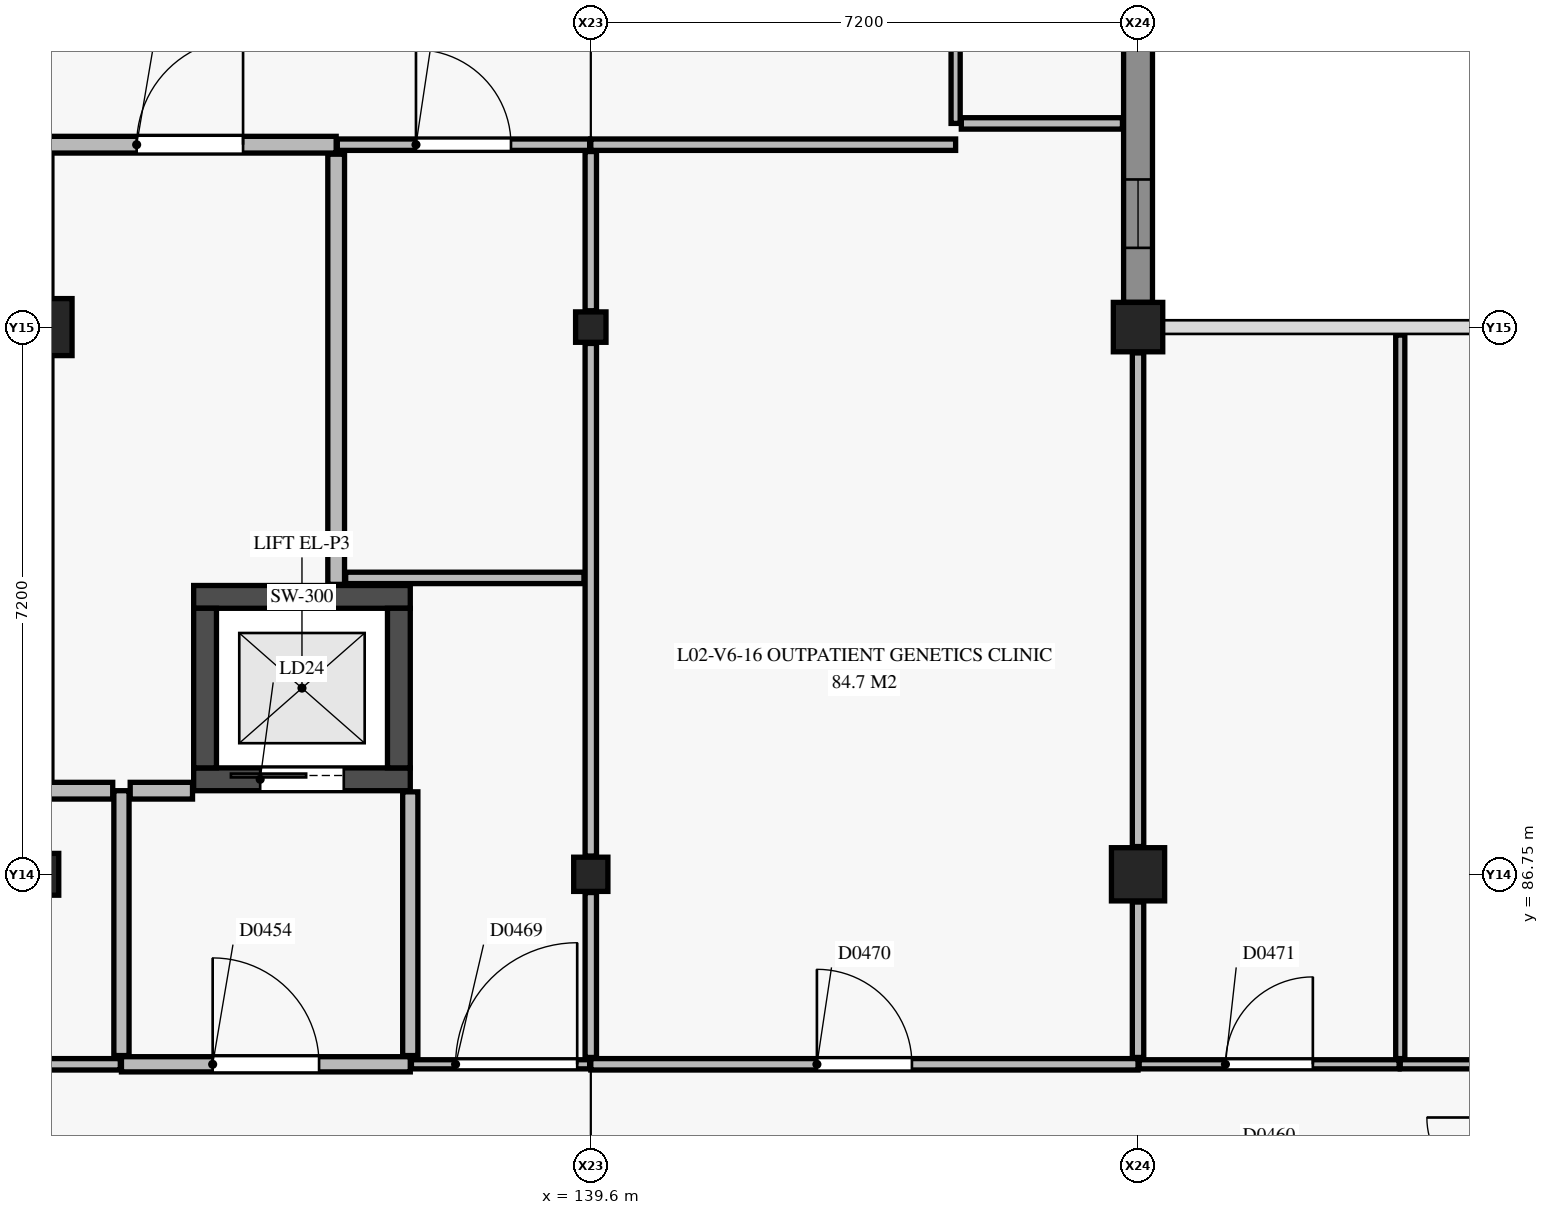
"""IFC4 building model, lengths in metres.
Left out: names, types, materials, properties, quantities, classifications, styles, units other than length and angle.
Written with IfcOpenShell. Run it as: python <this file> out.ifc"""

import sys

from ifc_helpers import new_model, si_unit, direction, frame, frame_2d, origin, origin_2d, place, context, subcontext, project, spatial, rectangle, extrude, element, fill, save


model = new_model("IFC4")
c1 = context("Model", 3, precision=1e-05, world=origin(), true_north=direction((0.0, 1.0)))
c2 = subcontext(c1, "Body", "Model", "MODEL_VIEW")
j1 = project(units=[si_unit("LENGTHUNIT", "METRE"), si_unit("PLANEANGLEUNIT", "RADIAN")], contexts=[c1])
p1 = place(None, origin())
s1 = spatial("IfcSite", under=j1, at=p1, CompositionType="ELEMENT")
p2 = place(p1, origin())
s2 = spatial("IfcBuilding", under=s1, at=p2, CompositionType="ELEMENT")
p3 = place(p2, frame((0.0, 0.0, 9.0)))
s3 = spatial("IfcBuildingStorey", under=s2, at=p3, CompositionType="ELEMENT", Elevation=9.0)
p4 = place(p3, frame((132.4, 86.75, 0.0), z_axis=(0.0, 0.0, 1.0), x_axis=(1.0, 0.0, 0.0)))
e1 = element("IfcColumn", 1, at=p4, inside=s3, PredefinedType="COLUMN", context=c2, shape_type="SweptSolid", body=[
    extrude(rectangle(XDim=0.4, YDim=0.55, at=origin_2d()), origin(), (0.0, 0.0, 1.0), 4.2),
])
p5 = place(p3, frame((132.4, 93.95, 0.0), z_axis=(0.0, 0.0, 1.0), x_axis=(1.0, 0.0, 0.0)))
e2 = element("IfcColumn", 2, at=p5, inside=s3, PredefinedType="COLUMN", context=c2, shape_type="SweptSolid", body=[
    extrude(rectangle(XDim=0.75, YDim=0.75, at=origin_2d()), origin(), (0.0, 0.0, 1.0), 4.2),
])
p6 = place(p3, frame((139.6, 86.75, 0.0), z_axis=(0.0, 0.0, 1.0), x_axis=(1.0, 0.0, 0.0)))
e3 = element("IfcColumn", 3, at=p6, inside=s3, PredefinedType="COLUMN", context=c2, shape_type="SweptSolid", body=[
    extrude(rectangle(XDim=0.45, YDim=0.45, at=origin_2d()), origin(), (0.0, 0.0, 1.0), 4.2),
])
p7 = place(p3, frame((139.6, 93.95, 0.0), z_axis=(0.0, 0.0, 1.0), x_axis=(1.0, 0.0, 0.0)))
e4 = element("IfcColumn", 4, at=p7, inside=s3, PredefinedType="COLUMN", context=c2, shape_type="SweptSolid", body=[
    extrude(rectangle(XDim=0.4, YDim=0.4, at=origin_2d()), origin(), (0.0, 0.0, 1.0), 4.2),
])
p8 = place(p3, frame((146.8, 86.75, 0.0), z_axis=(0.0, 0.0, 1.0), x_axis=(1.0, 0.0, 0.0)))
e5 = element("IfcColumn", 5, at=p8, inside=s3, PredefinedType="COLUMN", context=c2, shape_type="SweptSolid", body=[
    extrude(rectangle(XDim=0.7, YDim=0.7, at=origin_2d()), origin(), (0.0, 0.0, 1.0), 4.2),
])
p9 = place(p3, frame((146.8, 93.95, 0.0), z_axis=(0.0, 0.0, 1.0), x_axis=(1.0, 0.0, 0.0)))
e6 = element("IfcColumn", 6, at=p9, inside=s3, PredefinedType="COLUMN", context=c2, shape_type="SweptSolid", body=[
    extrude(rectangle(XDim=0.65, YDim=0.65, at=origin_2d()), origin(), (0.0, 0.0, 1.0), 4.2),
])
p10 = place(p3, frame((134.375, 88.0, 0.0), z_axis=(0.0, 0.0, 1.0), x_axis=(1.0, 0.0, 0.0)))
e7 = element("IfcWall", 7, at=p10, inside=s3, PredefinedType="SHEAR", context=c2, shape_type="SweptSolid", body=[
    extrude(rectangle(XDim=2.85, YDim=0.3, at=frame_2d((1.425, 0.0))), origin(), (0.0, 0.0, 1.0), 3.95),
])
p11 = place(p10, frame((0.875, 0.0, 0.0)))
e8 = element("IfcOpeningElement", 8, at=p11, cuts=e7, PredefinedType="OPENING", context=c2, shape_type="SweptSolid", body=[
    extrude(rectangle(XDim=1.1, YDim=2.15, at=frame_2d((0.55, 1.075))), frame((0.0, 0.16, 0.0), z_axis=(0.0, -1.0, 0.0), x_axis=(1.0, 0.0, 0.0)), (0.0, 0.0, 1.0), 0.32),
])
p12 = place(p3, frame((134.375, 90.4, 0.0), z_axis=(0.0, 0.0, 1.0), x_axis=(1.0, 0.0, 0.0)))
e9 = element("IfcWall", 9, at=p12, inside=s3, PredefinedType="SHEAR", context=c2, shape_type="SweptSolid", body=[
    extrude(rectangle(XDim=2.85, YDim=0.3, at=frame_2d((1.425, 0.0))), origin(), (0.0, 0.0, 1.0), 3.95),
])
for number, where, z_axis, x_axis in (
    (10, (134.525, 88.15, 0.0), (0.0, 0.0, 1.0), (0.0, 1.0, 0.0)),
    (11, (137.075, 88.15, 0.0), (0.0, 0.0, 1.0), (0.0, 1.0, 0.0)),
):
    element("IfcWall", number, at=place(p3, frame(where, z_axis=z_axis, x_axis=x_axis)), inside=s3, PredefinedType="SHEAR", context=c2, shape_type="SweptSolid", body=[
        extrude(rectangle(XDim=2.1, YDim=0.3, at=frame_2d((1.05, 0.0))), origin(), (0.0, 0.0, 1.0), 3.95),
    ])
p13 = place(p3, frame((146.8, 100.85, 0.0), z_axis=(0.0, 0.0, 1.0), x_axis=(0.0, -1.0, 0.0)))
e12 = element("IfcWall", 12, at=p13, inside=s3, PredefinedType="USERDEFINED", context=c2, shape_type="SweptSolid", body=[
    extrude(rectangle(XDim=6.575, YDim=0.38, at=frame_2d((3.288, 0.0))), origin(), (0.0, 0.0, 1.0), 3.13),
])
p14 = place(p13, frame((1.3, 0.0, 0.9)))
e13 = element("IfcOpeningElement", 13, at=p14, cuts=e12, PredefinedType="OPENING", context=c2, shape_type="SweptSolid", body=[
    extrude(rectangle(XDim=1.6, YDim=1.8, at=frame_2d((0.8, 0.9))), frame((0.0, 0.2, 0.0), z_axis=(0.0, -1.0, 0.0), x_axis=(1.0, 0.0, 0.0)), (0.0, 0.0, 1.0), 0.4),
])
p15 = place(p13, frame((4.958, 0.0, 0.95)))
e14 = element("IfcOpeningElement", 14, at=p15, cuts=e12, PredefinedType="OPENING", context=c2, shape_type="SweptSolid", body=[
    extrude(rectangle(XDim=0.9, YDim=1.2, at=frame_2d((0.45, 0.6))), frame((0.0, 0.2, 0.0), z_axis=(0.0, -1.0, 0.0), x_axis=(1.0, 0.0, 0.0)), (0.0, 0.0, 1.0), 0.4),
])
p16 = place(p3, frame((133.425, 84.25, 0.0), z_axis=(0.0, 0.0, 1.0), x_axis=(1.0, 0.0, 0.0)))
e15 = element("IfcWall", 15, at=p16, inside=s3, PredefinedType="PARTITIONING", context=c2, shape_type="SweptSolid", body=[
    extrude(rectangle(XDim=3.8, YDim=0.2, at=frame_2d((1.9, 0.0))), origin(), (0.0, 0.0, 1.0), 3.515),
])
p17 = place(p16, frame((1.2, 0.0, 0.0)))
e16 = element("IfcOpeningElement", 16, at=p17, cuts=e15, PredefinedType="OPENING", context=c2, shape_type="SweptSolid", body=[
    extrude(rectangle(XDim=1.4, YDim=2.2, at=frame_2d((0.7, 1.1))), frame((0.0, 0.11, 0.0), z_axis=(0.0, -1.0, 0.0), x_axis=(1.0, 0.0, 0.0)), (0.0, 0.0, 1.0), 0.22),
])
p18 = place(p3, frame((137.225, 84.365, 0.0), z_axis=(0.0, 0.0, 1.0), x_axis=(0.0, 1.0, 0.0)))
e17 = element("IfcWall", 17, at=p18, inside=s3, PredefinedType="PARTITIONING", context=c2, shape_type="SweptSolid", body=[
    extrude(rectangle(XDim=3.47, YDim=0.2, at=frame_2d((1.735, 0.0))), origin(), (0.0, 0.0, 1.0), 3.355),
])
p19 = place(p3, frame((133.425, 84.365, 0.0), z_axis=(0.0, 0.0, 1.0), x_axis=(0.0, 1.0, 0.0)))
e18 = element("IfcWall", 18, at=p19, inside=s3, PredefinedType="PARTITIONING", context=c2, shape_type="SweptSolid", body=[
    extrude(rectangle(XDim=3.485, YDim=0.2, at=frame_2d((1.743, 0.0))), origin(), (0.0, 0.0, 1.0), 3.355),
])
p20 = place(p3, frame((132.4, 96.35, 0.0), z_axis=(0.0, 0.0, 1.0), x_axis=(1.0, 0.0, 0.0)))
e19 = element("IfcWall", 19, at=p20, inside=s3, PredefinedType="PARTITIONING", context=c2, shape_type="SweptSolid", body=[
    extrude(rectangle(XDim=3.85, YDim=0.22, at=frame_2d((1.925, 0.0))), origin(), (0.0, 0.0, 1.0), 3.415),
])
p21 = place(p20, frame((1.225, 0.0, 0.0)))
e20 = element("IfcOpeningElement", 20, at=p21, cuts=e19, PredefinedType="OPENING", context=c2, shape_type="SweptSolid", body=[
    extrude(rectangle(XDim=1.4, YDim=2.2, at=frame_2d((0.7, 1.1))), frame((0.0, 0.12, 0.0), z_axis=(0.0, -1.0, 0.0), x_axis=(1.0, 0.0, 0.0)), (0.0, 0.0, 1.0), 0.24),
])
p22 = place(p3, frame((132.415, 84.25, 0.0), z_axis=(0.0, 0.0, 1.0), x_axis=(1.0, 0.0, 0.0)))
e21 = element("IfcWall", 21, at=p22, inside=s3, PredefinedType="PARTITIONING", context=c2, shape_type="SweptSolid", body=[
    extrude(rectangle(XDim=0.995, YDim=0.15, at=frame_2d((0.498, 0.0))), origin(), (0.0, 0.0, 1.0), 3.285),
])
p23 = place(p3, frame((139.6, 84.25, 0.0), z_axis=(0.0, 0.0, 1.0), x_axis=(1.0, 0.0, 0.0)))
e22 = element("IfcWall", 22, at=p23, inside=s3, PredefinedType="PARTITIONING", context=c2, shape_type="SweptSolid", body=[
    extrude(rectangle(XDim=7.2, YDim=0.15, at=frame_2d((3.6, 0.0))), origin(), (0.0, 0.0, 1.0), 3.285),
])
p24 = place(p23, frame((2.975, 0.0, 0.0)))
e23 = element("IfcOpeningElement", 23, at=p24, cuts=e22, PredefinedType="OPENING", context=c2, shape_type="SweptSolid", body=[
    extrude(rectangle(XDim=1.25, YDim=2.15, at=frame_2d((0.625, 1.075))), frame((0.0, 0.085, 0.0), z_axis=(0.0, -1.0, 0.0), x_axis=(1.0, 0.0, 0.0)), (0.0, 0.0, 1.0), 0.17),
])
p25 = place(p3, frame((139.6, 96.35, 0.0), z_axis=(0.0, 0.0, 1.0), x_axis=(1.0, 0.0, 0.0)))
e24 = element("IfcWall", 24, at=p25, inside=s3, PredefinedType="PARTITIONING", context=c2, shape_type="SweptSolid", body=[
    extrude(rectangle(XDim=4.8, YDim=0.15, at=frame_2d((2.4, 0.0))), origin(), (0.0, 0.0, 1.0), 3.285),
])
p26 = place(p3, frame((136.265, 96.35, 0.0), z_axis=(0.0, 0.0, 1.0), x_axis=(1.0, 0.0, 0.0)))
e25 = element("IfcWall", 25, at=p26, inside=s3, PredefinedType="PARTITIONING", context=c2, shape_type="SweptSolid", body=[
    extrude(rectangle(XDim=3.32, YDim=0.15, at=frame_2d((1.66, 0.0))), origin(), (0.0, 0.0, 1.0), 3.285),
])
p27 = place(p26, frame((1.035, 0.0, 0.0)))
e26 = element("IfcOpeningElement", 26, at=p27, cuts=e25, PredefinedType="OPENING", context=c2, shape_type="SweptSolid", body=[
    extrude(rectangle(XDim=1.25, YDim=2.15, at=frame_2d((0.625, 1.075))), frame((0.0, 0.085, 0.0), z_axis=(0.0, -1.0, 0.0), x_axis=(1.0, 0.0, 0.0)), (0.0, 0.0, 1.0), 0.17),
])
p28 = place(p3, frame((150.25, 84.25, 0.0), z_axis=(0.0, 0.0, 1.0), x_axis=(1.0, 0.0, 0.0)))
e27 = element("IfcWall", 27, at=p28, inside=s3, PredefinedType="PARTITIONING", context=c2, shape_type="SweptSolid", body=[
    extrude(rectangle(XDim=1.35, YDim=0.12, at=frame_2d((0.675, 0.0))), origin(), (0.0, 0.0, 1.0), 3.95),
])
p29 = place(p3, frame((137.24, 84.25, 0.0), z_axis=(0.0, 0.0, 1.0), x_axis=(1.0, 0.0, 0.0)))
e28 = element("IfcWall", 28, at=p29, inside=s3, PredefinedType="PARTITIONING", context=c2, shape_type="SweptSolid", body=[
    extrude(rectangle(XDim=2.345, YDim=0.12, at=frame_2d((1.172, 0.0))), origin(), (0.0, 0.0, 1.0), 3.455),
])
p30 = place(p29, frame((0.581, 0.0, 0.0)))
e29 = element("IfcOpeningElement", 29, at=p30, cuts=e28, PredefinedType="OPENING", context=c2, shape_type="SweptSolid", body=[
    extrude(rectangle(XDim=1.6, YDim=2.25, at=frame_2d((0.8, 1.125))), frame((0.0, 0.07, 0.0), z_axis=(0.0, -1.0, 0.0), x_axis=(1.0, 0.0, 0.0)), (0.0, 0.0, 1.0), 0.14),
])
p31 = place(p3, frame((146.815, 84.25, 0.0), z_axis=(0.0, 0.0, 1.0), x_axis=(1.0, 0.0, 0.0)))
e30 = element("IfcWall", 30, at=p31, inside=s3, PredefinedType="PARTITIONING", context=c2, shape_type="SweptSolid", body=[
    extrude(rectangle(XDim=3.42, YDim=0.12, at=frame_2d((1.71, 0.0))), origin(), (0.0, 0.0, 1.0), 3.285),
])
p32 = place(p31, frame((1.135, 0.0, 0.0)))
e31 = element("IfcOpeningElement", 31, at=p32, cuts=e30, PredefinedType="OPENING", context=c2, shape_type="SweptSolid", body=[
    extrude(rectangle(XDim=1.15, YDim=2.15, at=frame_2d((0.575, 1.075))), frame((0.0, 0.07, 0.0), z_axis=(0.0, -1.0, 0.0), x_axis=(1.0, 0.0, 0.0)), (0.0, 0.0, 1.0), 0.14),
])
p33 = place(p3, frame((144.4, 96.63, 0.0), z_axis=(0.0, 0.0, 1.0), x_axis=(0.0, 1.0, 0.0)))
e32 = element("IfcWall", 32, at=p33, inside=s3, PredefinedType="PARTITIONING", context=c2, shape_type="SweptSolid", body=[
    extrude(rectangle(XDim=2.12, YDim=0.12, at=frame_2d((1.06, 0.0))), origin(), (0.0, 0.0, 1.0), 3.475),
])
p34 = place(p3, frame((132.4, 87.85, 0.0), z_axis=(0.0, 0.0, 1.0), x_axis=(1.0, 0.0, 0.0)))
e33 = element("IfcWall", 33, at=p34, inside=s3, PredefinedType="PARTITIONING", context=c2, shape_type="SweptSolid", body=[
    extrude(rectangle(XDim=0.91, YDim=0.22, at=frame_2d((0.455, 0.0))), origin(), (0.0, 0.0, 1.0), 3.285),
])
p35 = place(p3, frame((136.25, 90.565, 0.0), z_axis=(0.0, 0.0, 1.0), x_axis=(0.0, 1.0, 0.0)))
e34 = element("IfcWall", 34, at=p35, inside=s3, PredefinedType="PARTITIONING", context=c2, shape_type="SweptSolid", body=[
    extrude(rectangle(XDim=5.66, YDim=0.22, at=frame_2d((2.83, 0.0))), origin(), (0.0, 0.0, 1.0), 3.135),
])
p36 = place(p3, frame((133.54, 87.85, 0.0), z_axis=(0.0, 0.0, 1.0), x_axis=(1.0, 0.0, 0.0)))
e35 = element("IfcWall", 35, at=p36, inside=s3, PredefinedType="PARTITIONING", context=c2, shape_type="SweptSolid", body=[
    extrude(rectangle(XDim=0.82, YDim=0.22, at=frame_2d((0.41, 0.0))), origin(), (0.0, 0.0, 1.0), 3.95),
])
p37 = place(p3, frame((139.6, 84.34, 0.0), z_axis=(0.0, 0.0, 1.0), x_axis=(0.0, 1.0, 0.0)))
e36 = element("IfcWall", 36, at=p37, inside=s3, PredefinedType="PARTITIONING", context=c2, shape_type="SweptSolid", body=[
    extrude(rectangle(XDim=2.17, YDim=0.15, at=frame_2d((1.085, 0.0))), origin(), (0.0, 0.0, 1.0), 3.455),
])
p38 = place(p3, frame((139.6, 86.99, 0.0), z_axis=(0.0, 0.0, 1.0), x_axis=(0.0, 1.0, 0.0)))
e37 = element("IfcWall", 37, at=p38, inside=s3, PredefinedType="PARTITIONING", context=c2, shape_type="SweptSolid", body=[
    extrude(rectangle(XDim=6.745, YDim=0.15, at=frame_2d((3.373, 0.0))), origin(), (0.0, 0.0, 1.0), 3.215),
])
p39 = place(p3, frame((139.6, 94.165, 0.0), z_axis=(0.0, 0.0, 1.0), x_axis=(0.0, 1.0, 0.0)))
e38 = element("IfcWall", 38, at=p39, inside=s3, PredefinedType="PARTITIONING", context=c2, shape_type="SweptSolid", body=[
    extrude(rectangle(XDim=2.095, YDim=0.15, at=frame_2d((1.047, 0.0))), origin(), (0.0, 0.0, 1.0), 3.285),
])
p40 = place(p3, frame((136.375, 90.65, 0.0), z_axis=(0.0, 0.0, 1.0), x_axis=(1.0, 0.0, 0.0)))
e39 = element("IfcWall", 39, at=p40, inside=s3, PredefinedType="PARTITIONING", context=c2, shape_type="SweptSolid", body=[
    extrude(rectangle(XDim=3.135, YDim=0.15, at=frame_2d((1.567, 0.0))), origin(), (0.0, 0.0, 1.0), 3.215),
])
p41 = place(p3, frame((144.475, 96.63, 0.0), z_axis=(0.0, 0.0, 1.0), x_axis=(1.0, 0.0, 0.0)))
e40 = element("IfcWall", 40, at=p41, inside=s3, PredefinedType="PARTITIONING", context=c2, shape_type="SweptSolid", body=[
    extrude(rectangle(XDim=2.12, YDim=0.15, at=frame_2d((1.06, 0.0))), origin(), (0.0, 0.0, 1.0), 3.95),
])
p42 = place(p3, frame((146.8, 84.34, 0.0), z_axis=(0.0, 0.0, 1.0), x_axis=(0.0, 1.0, 0.0)))
e41 = element("IfcWall", 41, at=p42, inside=s3, PredefinedType="PARTITIONING", context=c2, shape_type="SweptSolid", body=[
    extrude(rectangle(XDim=2.045, YDim=0.15, at=frame_2d((1.022, 0.0))), origin(), (0.0, 0.0, 1.0), 3.285),
])
p43 = place(p3, frame((146.8, 87.115, 0.0), z_axis=(0.0, 0.0, 1.0), x_axis=(0.0, 1.0, 0.0)))
e42 = element("IfcWall", 42, at=p43, inside=s3, PredefinedType="PARTITIONING", context=c2, shape_type="SweptSolid", body=[
    extrude(rectangle(XDim=6.495, YDim=0.15, at=frame_2d((3.248, 0.0))), origin(), (0.0, 0.0, 1.0), 3.415),
])
p44 = place(p3, frame((150.25, 84.325, 0.0), z_axis=(0.0, 0.0, 1.0), x_axis=(0.0, 1.0, 0.0)))
e43 = element("IfcWall", 43, at=p44, inside=s3, PredefinedType="PARTITIONING", context=c2, shape_type="SweptSolid", body=[
    extrude(rectangle(XDim=9.52, YDim=0.12, at=frame_2d((4.76, 0.0))), origin(), (0.0, 0.0, 1.0), 3.48),
])
p45 = place(p15, origin())
e44 = element("IfcWindow", 44, at=p45, inside=s3, PartitioningType="SINGLE_PANEL", PredefinedType="WINDOW", context=c2, shape_type="SweptSolid", body=[
    extrude(rectangle(XDim=0.9, YDim=1.2, at=frame_2d((0.45, 0.6))), frame((0.0, 0.03, 0.0), z_axis=(0.0, -1.0, 0.0), x_axis=(1.0, 0.0, 0.0)), (0.0, 0.0, 1.0), 0.06),
])
fill(e14, e44)
p46 = place(p11, origin())
e45 = element("IfcDoor", 45, at=p46, inside=s3, OperationType="SLIDING_TO_LEFT", PredefinedType="DOOR", context=c2, shape_type="SweptSolid", body=[
    extrude(rectangle(XDim=1.1, YDim=2.15, at=frame_2d((0.55, 1.075))), frame((0.0, 0.025, 0.0), z_axis=(0.0, -1.0, 0.0), x_axis=(1.0, 0.0, 0.0)), (0.0, 0.0, 1.0), 0.05),
])
fill(e8, e45)
p47 = place(p17, origin())
e46 = element("IfcDoor", 46, at=p47, inside=s3, OperationType="SINGLE_SWING_LEFT", PredefinedType="DOOR", context=c2, shape_type="SweptSolid", body=[
    extrude(rectangle(XDim=1.4, YDim=2.2, at=frame_2d((0.7, 1.1))), frame((0.0, 0.025, 0.0), z_axis=(0.0, -1.0, 0.0), x_axis=(1.0, 0.0, 0.0)), (0.0, 0.0, 1.0), 0.05),
])
fill(e16, e46)
p48 = place(p30, origin())
e47 = element("IfcDoor", 47, at=p48, inside=s3, OperationType="SINGLE_SWING_RIGHT", PredefinedType="DOOR", context=c2, shape_type="SweptSolid", body=[
    extrude(rectangle(XDim=1.6, YDim=2.25, at=frame_2d((0.8, 1.125))), frame((0.0, 0.025, 0.0), z_axis=(0.0, -1.0, 0.0), x_axis=(1.0, 0.0, 0.0)), (0.0, 0.0, 1.0), 0.05),
])
fill(e29, e47)
p49 = place(p24, origin())
e48 = element("IfcDoor", 48, at=p49, inside=s3, OperationType="SINGLE_SWING_LEFT", PredefinedType="DOOR", context=c2, shape_type="SweptSolid", body=[
    extrude(rectangle(XDim=1.25, YDim=2.15, at=frame_2d((0.625, 1.075))), frame((0.0, 0.025, 0.0), z_axis=(0.0, -1.0, 0.0), x_axis=(1.0, 0.0, 0.0)), (0.0, 0.0, 1.0), 0.05),
])
fill(e23, e48)
p50 = place(p32, origin())
e49 = element("IfcDoor", 49, at=p50, inside=s3, OperationType="SINGLE_SWING_RIGHT", PredefinedType="DOOR", context=c2, shape_type="SweptSolid", body=[
    extrude(rectangle(XDim=1.15, YDim=2.15, at=frame_2d((0.575, 1.075))), frame((0.0, 0.025, 0.0), z_axis=(0.0, -1.0, 0.0), x_axis=(1.0, 0.0, 0.0)), (0.0, 0.0, 1.0), 0.05),
])
fill(e31, e49)
p51 = place(p21, origin())
e50 = element("IfcDoor", 50, at=p51, inside=s3, OperationType="SINGLE_SWING_RIGHT", PredefinedType="DOOR", context=c2, shape_type="SweptSolid", body=[
    extrude(rectangle(XDim=1.4, YDim=2.2, at=frame_2d((0.7, 1.1))), frame((0.0, 0.025, 0.0), z_axis=(0.0, -1.0, 0.0), x_axis=(1.0, 0.0, 0.0)), (0.0, 0.0, 1.0), 0.05),
])
fill(e20, e50)
p52 = place(p27, origin())
e51 = element("IfcDoor", 51, at=p52, inside=s3, OperationType="SINGLE_SWING_LEFT", PredefinedType="DOOR", context=c2, shape_type="SweptSolid", body=[
    extrude(rectangle(XDim=1.25, YDim=2.15, at=frame_2d((0.625, 1.075))), frame((0.0, 0.025, 0.0), z_axis=(0.0, -1.0, 0.0), x_axis=(1.0, 0.0, 0.0)), (0.0, 0.0, 1.0), 0.05),
])
fill(e26, e51)
save(model, sys.argv[1])
